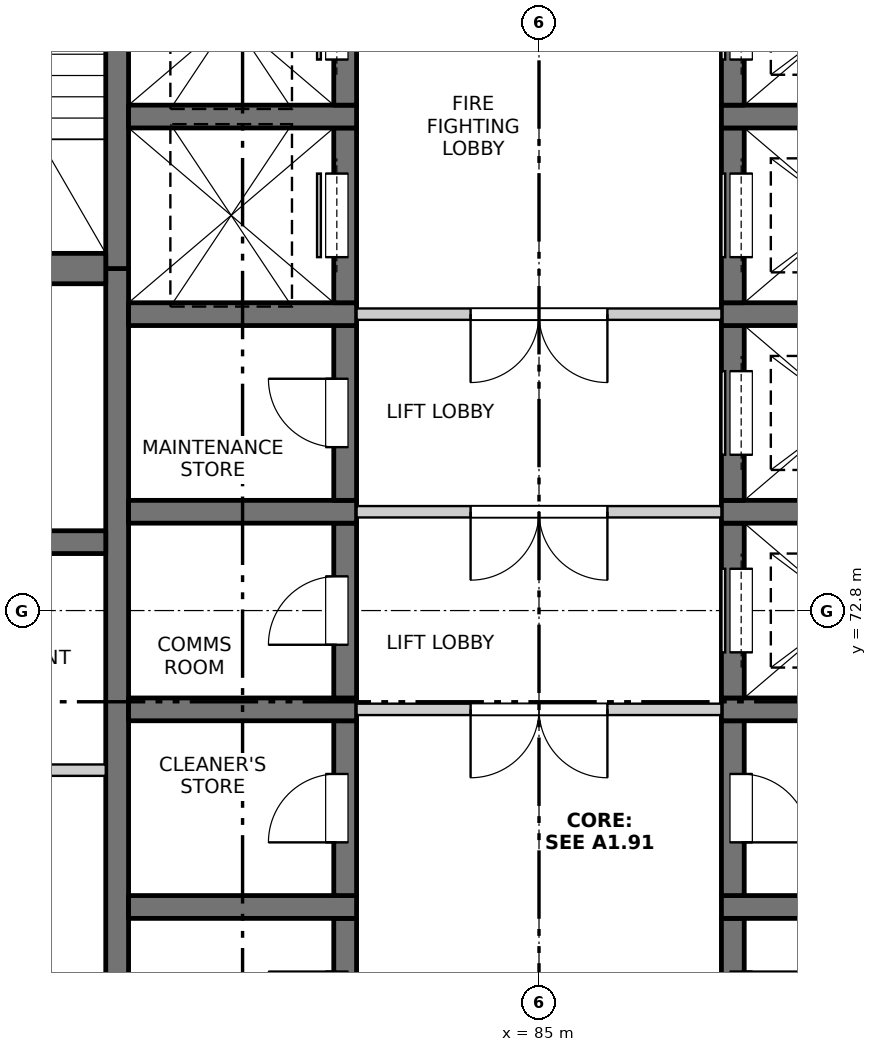
"""IFC4 building model, lengths in metres.
Left out: names, types, materials, properties, quantities, classifications, styles, units other than length and angle.
Written with IfcOpenShell. Run it as: python <this file> out.ifc"""

import sys

from ifc_helpers import new_model, si_unit, direction, frame, frame_2d, origin, place, context, subcontext, project, spatial, rectangle, extrude, element, fill, save


model = new_model("IFC4")
c1 = context("Model", 3, precision=1e-05, world=origin(), true_north=direction((0.0, 1.0)))
c2 = subcontext(c1, "Body", "Model", "MODEL_VIEW")
j1 = project(units=[si_unit("LENGTHUNIT", "METRE"), si_unit("PLANEANGLEUNIT", "RADIAN")], contexts=[c1])
p1 = place(None, origin())
s1 = spatial("IfcSite", under=j1, at=p1, CompositionType="ELEMENT")
p2 = place(p1, origin())
s2 = spatial("IfcBuilding", under=s1, at=p2, CompositionType="ELEMENT")
p3 = place(p2, frame((0.0, 0.0, 140.7)))
s3 = spatial("IfcBuildingStorey", under=s2, at=p3, CompositionType="ELEMENT", Elevation=140.7)
p4 = place(p3, frame((79.45, 60.95, -0.25), z_axis=(0.0, 0.0, 1.0), x_axis=(0.0, 1.0, 0.0)))
e1 = element("IfcWall", 1, at=p4, inside=s3, PredefinedType="SOLIDWALL", context=c2, shape_type="SweptSolid", body=[
    extrude(rectangle(XDim=16.35, YDim=0.3, at=frame_2d((8.175, 0.0))), origin(), (0.0, 0.0, 1.0), 3.35),
])
p5 = place(p3, frame((79.45, 77.3, -0.25), z_axis=(0.0, 0.0, 1.0), x_axis=(0.0, 1.0, 0.0)))
e2 = element("IfcWall", 2, at=p5, inside=s3, PredefinedType="SOLIDWALL", context=c2, shape_type="SweptSolid", body=[
    extrude(rectangle(XDim=6.925, YDim=0.3, at=frame_2d((3.462, 0.0))), origin(), (0.0, 0.0, 1.0), 3.35),
])
p6 = place(p3, frame((82.45, 66.45, -0.25), z_axis=(0.0, 0.0, 1.0), x_axis=(0.0, 1.0, 0.0)))
e3 = element("IfcWall", 3, at=p6, inside=s3, PredefinedType="SOLIDWALL", context=c2, shape_type="SweptSolid", body=[
    extrude(rectangle(XDim=2.3, YDim=0.3, at=frame_2d((1.15, 0.0))), origin(), (0.0, 0.0, 1.0), 3.35),
])
p7 = place(p6, frame((0.7, 0.0, 0.25)))
e4 = element("IfcOpeningElement", 4, at=p7, cuts=e3, PredefinedType="OPENING", context=c2, shape_type="SweptSolid", body=[
    extrude(rectangle(XDim=0.9, YDim=2.1, at=frame_2d((0.45, 1.05))), frame((0.0, 0.16, 0.0), z_axis=(0.0, -1.0, 0.0), x_axis=(1.0, 0.0, 0.0)), (0.0, 0.0, 1.0), 0.32),
])
p8 = place(p3, frame((79.6, 68.9, -0.25), z_axis=(0.0, 0.0, 1.0), x_axis=(1.0, 0.0, 0.0)))
e5 = element("IfcWall", 5, at=p8, inside=s3, PredefinedType="SOLIDWALL", context=c2, shape_type="SweptSolid", body=[
    extrude(rectangle(XDim=3.0, YDim=0.3, at=frame_2d((1.5, 0.0))), origin(), (0.0, 0.0, 1.0), 3.35),
])
p9 = place(p3, frame((82.45, 69.05, -0.25), z_axis=(0.0, 0.0, 1.0), x_axis=(0.0, 1.0, 0.0)))
e6 = element("IfcWall", 6, at=p9, inside=s3, PredefinedType="SOLIDWALL", context=c2, shape_type="SweptSolid", body=[
    extrude(rectangle(XDim=2.3, YDim=0.3, at=frame_2d((1.15, 0.0))), origin(), (0.0, 0.0, 1.0), 3.35),
])
p10 = place(p9, frame((0.7, 0.0, 0.25)))
e7 = element("IfcOpeningElement", 7, at=p10, cuts=e6, PredefinedType="OPENING", context=c2, shape_type="SweptSolid", body=[
    extrude(rectangle(XDim=0.9, YDim=2.1, at=frame_2d((0.45, 1.05))), frame((0.0, 0.16, 0.0), z_axis=(0.0, -1.0, 0.0), x_axis=(1.0, 0.0, 0.0)), (0.0, 0.0, 1.0), 0.32),
])
p11 = place(p3, frame((79.6, 71.5, -0.25), z_axis=(0.0, 0.0, 1.0), x_axis=(1.0, 0.0, 0.0)))
e8 = element("IfcWall", 8, at=p11, inside=s3, PredefinedType="SOLIDWALL", context=c2, shape_type="SweptSolid", body=[
    extrude(rectangle(XDim=3.0, YDim=0.3, at=frame_2d((1.5, 0.0))), origin(), (0.0, 0.0, 1.0), 3.35),
])
p12 = place(p3, frame((82.45, 71.65, -0.25), z_axis=(0.0, 0.0, 1.0), x_axis=(0.0, 1.0, 0.0)))
e9 = element("IfcWall", 9, at=p12, inside=s3, PredefinedType="SOLIDWALL", context=c2, shape_type="SweptSolid", body=[
    extrude(rectangle(XDim=2.3, YDim=0.3, at=frame_2d((1.15, 0.0))), origin(), (0.0, 0.0, 1.0), 3.35),
])
p13 = place(p12, frame((0.7, 0.0, 0.25)))
e10 = element("IfcOpeningElement", 10, at=p13, cuts=e9, PredefinedType="OPENING", context=c2, shape_type="SweptSolid", body=[
    extrude(rectangle(XDim=0.9, YDim=2.1, at=frame_2d((0.45, 1.05))), frame((0.0, 0.16, 0.0), z_axis=(0.0, -1.0, 0.0), x_axis=(1.0, 0.0, 0.0)), (0.0, 0.0, 1.0), 0.32),
])
p14 = place(p3, frame((79.6, 74.1, -0.25), z_axis=(0.0, 0.0, 1.0), x_axis=(1.0, 0.0, 0.0)))
e11 = element("IfcWall", 11, at=p14, inside=s3, PredefinedType="SOLIDWALL", context=c2, shape_type="SweptSolid", body=[
    extrude(rectangle(XDim=3.0, YDim=0.3, at=frame_2d((1.5, 0.0))), origin(), (0.0, 0.0, 1.0), 3.35),
])
p15 = place(p3, frame((82.45, 74.25, -0.25), z_axis=(0.0, 0.0, 1.0), x_axis=(0.0, 1.0, 0.0)))
e12 = element("IfcWall", 12, at=p15, inside=s3, PredefinedType="SOLIDWALL", context=c2, shape_type="SweptSolid", body=[
    extrude(rectangle(XDim=2.3, YDim=0.3, at=frame_2d((1.15, 0.0))), origin(), (0.0, 0.0, 1.0), 3.35),
])
p16 = place(p15, frame((0.7, 0.0, 0.25)))
e13 = element("IfcOpeningElement", 13, at=p16, cuts=e12, PredefinedType="OPENING", context=c2, shape_type="SweptSolid", body=[
    extrude(rectangle(XDim=0.9, YDim=2.1, at=frame_2d((0.45, 1.05))), frame((0.0, 0.16, 0.0), z_axis=(0.0, -1.0, 0.0), x_axis=(1.0, 0.0, 0.0)), (0.0, 0.0, 1.0), 0.32),
])
p17 = place(p3, frame((79.6, 76.7, -0.25), z_axis=(0.0, 0.0, 1.0), x_axis=(1.0, 0.0, 0.0)))
e14 = element("IfcWall", 14, at=p17, inside=s3, PredefinedType="SOLIDWALL", context=c2, shape_type="SweptSolid", body=[
    extrude(rectangle(XDim=3.0, YDim=0.3, at=frame_2d((1.5, 0.0))), origin(), (0.0, 0.0, 1.0), 3.35),
])
p18 = place(p3, frame((82.45, 76.85, -0.25), z_axis=(0.0, 0.0, 1.0), x_axis=(0.0, 1.0, 0.0)))
e15 = element("IfcWall", 15, at=p18, inside=s3, PredefinedType="SOLIDWALL", context=c2, shape_type="SweptSolid", body=[
    extrude(rectangle(XDim=2.3, YDim=0.3, at=frame_2d((1.15, 0.0))), origin(), (0.0, 0.0, 1.0), 3.35),
])
p19 = place(p18, frame((0.6, 0.0, 0.25)))
e16 = element("IfcOpeningElement", 16, at=p19, cuts=e15, PredefinedType="OPENING", context=c2, shape_type="SweptSolid", body=[
    extrude(rectangle(XDim=1.1, YDim=2.1, at=frame_2d((0.55, 1.05))), frame((0.0, 0.16, 0.0), z_axis=(0.0, -1.0, 0.0), x_axis=(1.0, 0.0, 0.0)), (0.0, 0.0, 1.0), 0.32),
])
p20 = place(p3, frame((79.6, 79.3, -0.25), z_axis=(0.0, 0.0, 1.0), x_axis=(1.0, 0.0, 0.0)))
e17 = element("IfcWall", 17, at=p20, inside=s3, PredefinedType="SOLIDWALL", context=c2, shape_type="SweptSolid", body=[
    extrude(rectangle(XDim=3.0, YDim=0.3, at=frame_2d((1.5, 0.0))), origin(), (0.0, 0.0, 1.0), 3.35),
])
p21 = place(p3, frame((82.45, 79.45, -0.25), z_axis=(0.0, 0.0, 1.0), x_axis=(0.0, 1.0, 0.0)))
e18 = element("IfcWall", 18, at=p21, inside=s3, PredefinedType="SOLIDWALL", context=c2, shape_type="SweptSolid", body=[
    extrude(rectangle(XDim=2.3, YDim=0.3, at=frame_2d((1.15, 0.0))), origin(), (0.0, 0.0, 1.0), 3.35),
])
p22 = place(p21, frame((0.6, 0.0, 0.25)))
e19 = element("IfcOpeningElement", 19, at=p22, cuts=e18, PredefinedType="OPENING", context=c2, shape_type="SweptSolid", body=[
    extrude(rectangle(XDim=1.1, YDim=2.1, at=frame_2d((0.55, 1.05))), frame((0.0, 0.16, 0.0), z_axis=(0.0, -1.0, 0.0), x_axis=(1.0, 0.0, 0.0)), (0.0, 0.0, 1.0), 0.32),
])
p23 = place(p3, frame((87.55, 66.45, -0.25), z_axis=(0.0, 0.0, 1.0), x_axis=(0.0, 1.0, 0.0)))
e20 = element("IfcWall", 20, at=p23, inside=s3, PredefinedType="SOLIDWALL", context=c2, shape_type="SweptSolid", body=[
    extrude(rectangle(XDim=2.3, YDim=0.3, at=frame_2d((1.15, 0.0))), origin(), (0.0, 0.0, 1.0), 3.35),
])
p24 = place(p23, frame((0.7, 0.0, 0.25)))
e21 = element("IfcOpeningElement", 21, at=p24, cuts=e20, PredefinedType="OPENING", context=c2, shape_type="SweptSolid", body=[
    extrude(rectangle(XDim=0.9, YDim=2.1, at=frame_2d((0.45, 1.05))), frame((0.0, 0.16, 0.0), z_axis=(0.0, -1.0, 0.0), x_axis=(1.0, 0.0, 0.0)), (0.0, 0.0, 1.0), 0.32),
])
p25 = place(p3, frame((87.4, 68.9, -0.25), z_axis=(0.0, 0.0, 1.0), x_axis=(1.0, 0.0, 0.0)))
e22 = element("IfcWall", 22, at=p25, inside=s3, PredefinedType="SOLIDWALL", context=c2, shape_type="SweptSolid", body=[
    extrude(rectangle(XDim=3.0, YDim=0.3, at=frame_2d((1.5, 0.0))), origin(), (0.0, 0.0, 1.0), 3.35),
])
p26 = place(p3, frame((87.55, 69.05, -0.25), z_axis=(0.0, 0.0, 1.0), x_axis=(0.0, 1.0, 0.0)))
e23 = element("IfcWall", 23, at=p26, inside=s3, PredefinedType="SOLIDWALL", context=c2, shape_type="SweptSolid", body=[
    extrude(rectangle(XDim=2.3, YDim=0.3, at=frame_2d((1.15, 0.0))), origin(), (0.0, 0.0, 1.0), 3.35),
])
p27 = place(p26, frame((0.7, 0.0, 0.25)))
e24 = element("IfcOpeningElement", 24, at=p27, cuts=e23, PredefinedType="OPENING", context=c2, shape_type="SweptSolid", body=[
    extrude(rectangle(XDim=0.9, YDim=2.1, at=frame_2d((0.45, 1.05))), frame((0.0, 0.16, 0.0), z_axis=(0.0, -1.0, 0.0), x_axis=(1.0, 0.0, 0.0)), (0.0, 0.0, 1.0), 0.32),
])
p28 = place(p3, frame((87.4, 71.5, -0.25), z_axis=(0.0, 0.0, 1.0), x_axis=(1.0, 0.0, 0.0)))
e25 = element("IfcWall", 25, at=p28, inside=s3, PredefinedType="SOLIDWALL", context=c2, shape_type="SweptSolid", body=[
    extrude(rectangle(XDim=3.0, YDim=0.3, at=frame_2d((1.5, 0.0))), origin(), (0.0, 0.0, 1.0), 3.35),
])
p29 = place(p3, frame((87.55, 71.65, -0.25), z_axis=(0.0, 0.0, 1.0), x_axis=(0.0, 1.0, 0.0)))
e26 = element("IfcWall", 26, at=p29, inside=s3, PredefinedType="SOLIDWALL", context=c2, shape_type="SweptSolid", body=[
    extrude(rectangle(XDim=2.3, YDim=0.3, at=frame_2d((1.15, 0.0))), origin(), (0.0, 0.0, 1.0), 3.35),
])
p30 = place(p29, frame((0.6, 0.0, 0.25)))
e27 = element("IfcOpeningElement", 27, at=p30, cuts=e26, PredefinedType="OPENING", context=c2, shape_type="SweptSolid", body=[
    extrude(rectangle(XDim=1.1, YDim=2.1, at=frame_2d((0.55, 1.05))), frame((0.0, 0.16, 0.0), z_axis=(0.0, -1.0, 0.0), x_axis=(1.0, 0.0, 0.0)), (0.0, 0.0, 1.0), 0.32),
])
p31 = place(p3, frame((87.4, 74.1, -0.25), z_axis=(0.0, 0.0, 1.0), x_axis=(1.0, 0.0, 0.0)))
e28 = element("IfcWall", 28, at=p31, inside=s3, PredefinedType="SOLIDWALL", context=c2, shape_type="SweptSolid", body=[
    extrude(rectangle(XDim=3.0, YDim=0.3, at=frame_2d((1.5, 0.0))), origin(), (0.0, 0.0, 1.0), 3.35),
])
p32 = place(p3, frame((87.55, 74.25, -0.25), z_axis=(0.0, 0.0, 1.0), x_axis=(0.0, 1.0, 0.0)))
e29 = element("IfcWall", 29, at=p32, inside=s3, PredefinedType="SOLIDWALL", context=c2, shape_type="SweptSolid", body=[
    extrude(rectangle(XDim=2.3, YDim=0.3, at=frame_2d((1.15, 0.0))), origin(), (0.0, 0.0, 1.0), 3.35),
])
p33 = place(p32, frame((0.6, 0.0, 0.25)))
e30 = element("IfcOpeningElement", 30, at=p33, cuts=e29, PredefinedType="OPENING", context=c2, shape_type="SweptSolid", body=[
    extrude(rectangle(XDim=1.1, YDim=2.1, at=frame_2d((0.55, 1.05))), frame((0.0, 0.16, 0.0), z_axis=(0.0, -1.0, 0.0), x_axis=(1.0, 0.0, 0.0)), (0.0, 0.0, 1.0), 0.32),
])
p34 = place(p3, frame((87.4, 76.7, -0.25), z_axis=(0.0, 0.0, 1.0), x_axis=(1.0, 0.0, 0.0)))
e31 = element("IfcWall", 31, at=p34, inside=s3, PredefinedType="SOLIDWALL", context=c2, shape_type="SweptSolid", body=[
    extrude(rectangle(XDim=3.0, YDim=0.3, at=frame_2d((1.5, 0.0))), origin(), (0.0, 0.0, 1.0), 3.35),
])
p35 = place(p3, frame((87.55, 76.85, -0.25), z_axis=(0.0, 0.0, 1.0), x_axis=(0.0, 1.0, 0.0)))
e32 = element("IfcWall", 32, at=p35, inside=s3, PredefinedType="SOLIDWALL", context=c2, shape_type="SweptSolid", body=[
    extrude(rectangle(XDim=2.3, YDim=0.3, at=frame_2d((1.15, 0.0))), origin(), (0.0, 0.0, 1.0), 3.35),
])
p36 = place(p35, frame((0.6, 0.0, 0.25)))
e33 = element("IfcOpeningElement", 33, at=p36, cuts=e32, PredefinedType="OPENING", context=c2, shape_type="SweptSolid", body=[
    extrude(rectangle(XDim=1.1, YDim=2.1, at=frame_2d((0.55, 1.05))), frame((0.0, 0.16, 0.0), z_axis=(0.0, -1.0, 0.0), x_axis=(1.0, 0.0, 0.0)), (0.0, 0.0, 1.0), 0.32),
])
p37 = place(p3, frame((87.4, 79.3, -0.25), z_axis=(0.0, 0.0, 1.0), x_axis=(1.0, 0.0, 0.0)))
e34 = element("IfcWall", 34, at=p37, inside=s3, PredefinedType="SOLIDWALL", context=c2, shape_type="SweptSolid", body=[
    extrude(rectangle(XDim=3.0, YDim=0.3, at=frame_2d((1.5, 0.0))), origin(), (0.0, 0.0, 1.0), 3.35),
])
p38 = place(p3, frame((87.55, 79.45, -0.25), z_axis=(0.0, 0.0, 1.0), x_axis=(0.0, 1.0, 0.0)))
e35 = element("IfcWall", 35, at=p38, inside=s3, PredefinedType="SOLIDWALL", context=c2, shape_type="SweptSolid", body=[
    extrude(rectangle(XDim=2.3, YDim=0.3, at=frame_2d((1.15, 0.0))), origin(), (0.0, 0.0, 1.0), 3.35),
])
p39 = place(p38, frame((0.6, 0.0, 0.25)))
e36 = element("IfcOpeningElement", 36, at=p39, cuts=e35, PredefinedType="OPENING", context=c2, shape_type="SweptSolid", body=[
    extrude(rectangle(XDim=1.1, YDim=2.1, at=frame_2d((0.55, 1.05))), frame((0.0, 0.16, 0.0), z_axis=(0.0, -1.0, 0.0), x_axis=(1.0, 0.0, 0.0)), (0.0, 0.0, 1.0), 0.32),
])
p40 = place(p3, frame((75.525, 73.7, -0.25), z_axis=(0.0, 0.0, 1.0), x_axis=(1.0, 0.0, 0.0)))
e37 = element("IfcWall", 37, at=p40, inside=s3, PredefinedType="SOLIDWALL", context=c2, shape_type="SweptSolid", body=[
    extrude(rectangle(XDim=3.775, YDim=0.3, at=frame_2d((1.888, 0.0))), origin(), (0.0, 0.0, 1.0), 3.35),
])
p41 = place(p3, frame((75.525, 77.3, -0.25), z_axis=(0.0, 0.0, 1.0), x_axis=(1.0, 0.0, 0.0)))
e38 = element("IfcWall", 38, at=p41, inside=s3, PredefinedType="SOLIDWALL", context=c2, shape_type="SweptSolid", body=[
    extrude(rectangle(XDim=3.775, YDim=0.4, at=frame_2d((1.888, 0.0))), origin(), (0.0, 0.0, 1.0), 3.35),
])
p42 = place(p3, frame((75.525, 70.7, 0.0), z_axis=(0.0, 0.0, 1.0), x_axis=(1.0, 0.0, 0.0)))
e39 = element("IfcWall", 39, at=p42, inside=s3, PredefinedType="PARTITIONING", context=c2, shape_type="SweptSolid", body=[
    extrude(rectangle(XDim=3.775, YDim=0.15, at=frame_2d((1.887, 0.0))), origin(), (0.0, 0.0, 1.0), 3.1),
])
p43 = place(p3, frame((82.6, 71.5, 0.0), z_axis=(0.0, 0.0, 1.0), x_axis=(1.0, 0.0, 0.0)))
e40 = element("IfcWall", 40, at=p43, inside=s3, PredefinedType="PARTITIONING", context=c2, shape_type="SweptSolid", body=[
    extrude(rectangle(XDim=4.8, YDim=0.15, at=frame_2d((2.4, 0.0))), origin(), (0.0, 0.0, 1.0), 3.1),
])
p44 = place(p43, frame((1.5, 0.0, 0.0)))
e41 = element("IfcOpeningElement", 41, at=p44, cuts=e40, PredefinedType="OPENING", context=c2, shape_type="SweptSolid", body=[
    extrude(rectangle(XDim=1.8, YDim=2.1, at=frame_2d((0.9, 1.05))), frame((0.0, 0.085, 0.0), z_axis=(0.0, -1.0, 0.0), x_axis=(1.0, 0.0, 0.0)), (0.0, 0.0, 1.0), 0.17),
])
p45 = place(p3, frame((82.6, 74.1, 0.0), z_axis=(0.0, 0.0, 1.0), x_axis=(1.0, 0.0, 0.0)))
e42 = element("IfcWall", 42, at=p45, inside=s3, PredefinedType="PARTITIONING", context=c2, shape_type="SweptSolid", body=[
    extrude(rectangle(XDim=4.8, YDim=0.15, at=frame_2d((2.4, 0.0))), origin(), (0.0, 0.0, 1.0), 3.1),
])
p46 = place(p45, frame((1.5, 0.0, 0.0)))
e43 = element("IfcOpeningElement", 43, at=p46, cuts=e42, PredefinedType="OPENING", context=c2, shape_type="SweptSolid", body=[
    extrude(rectangle(XDim=1.8, YDim=2.1, at=frame_2d((0.9, 1.05))), frame((0.0, 0.085, 0.0), z_axis=(0.0, -1.0, 0.0), x_axis=(1.0, 0.0, 0.0)), (0.0, 0.0, 1.0), 0.17),
])
p47 = place(p3, frame((82.6, 76.7, 0.0), z_axis=(0.0, 0.0, 1.0), x_axis=(1.0, 0.0, 0.0)))
e44 = element("IfcWall", 44, at=p47, inside=s3, PredefinedType="PARTITIONING", context=c2, shape_type="SweptSolid", body=[
    extrude(rectangle(XDim=4.8, YDim=0.15, at=frame_2d((2.4, 0.0))), origin(), (0.0, 0.0, 1.0), 3.1),
])
p48 = place(p47, frame((1.5, 0.0, 0.0)))
e45 = element("IfcOpeningElement", 45, at=p48, cuts=e44, PredefinedType="OPENING", context=c2, shape_type="SweptSolid", body=[
    extrude(rectangle(XDim=1.8, YDim=2.1, at=frame_2d((0.9, 1.05))), frame((0.0, 0.085, 0.0), z_axis=(0.0, -1.0, 0.0), x_axis=(1.0, 0.0, 0.0)), (0.0, 0.0, 1.0), 0.17),
])
p49 = place(p10, origin())
e46 = element("IfcDoor", 46, at=p49, inside=s3, OperationType="SINGLE_SWING_LEFT", PredefinedType="DOOR", context=c2, shape_type="SweptSolid", body=[
    extrude(rectangle(XDim=0.9, YDim=2.1, at=frame_2d((0.45, 1.05))), frame((0.0, 0.135, 0.0), z_axis=(0.0, -1.0, 0.0), x_axis=(1.0, 0.0, 0.0)), (0.0, 0.0, 1.0), 0.05),
])
fill(e7, e46)
p50 = place(p27, origin())
e47 = element("IfcDoor", 47, at=p50, inside=s3, OperationType="SINGLE_SWING_RIGHT", PredefinedType="DOOR", context=c2, shape_type="SweptSolid", body=[
    extrude(rectangle(XDim=0.9, YDim=2.1, at=frame_2d((0.45, 1.05))), frame((0.0, -0.085, 0.0), z_axis=(0.0, -1.0, 0.0), x_axis=(1.0, 0.0, 0.0)), (0.0, 0.0, 1.0), 0.05),
])
fill(e24, e47)
p51 = place(p44, origin())
e48 = element("IfcDoor", 48, at=p51, inside=s3, OperationType="DOUBLE_DOOR_SINGLE_SWING", PredefinedType="DOOR", context=c2, shape_type="SweptSolid", body=[
    extrude(rectangle(XDim=1.8, YDim=2.1, at=frame_2d((0.9, 1.05))), frame((0.0, 0.025, 0.0), z_axis=(0.0, -1.0, 0.0), x_axis=(1.0, 0.0, 0.0)), (0.0, 0.0, 1.0), 0.05),
])
fill(e41, e48)
p52 = place(p13, origin())
e49 = element("IfcDoor", 49, at=p52, inside=s3, OperationType="SINGLE_SWING_LEFT", PredefinedType="DOOR", context=c2, shape_type="SweptSolid", body=[
    extrude(rectangle(XDim=0.9, YDim=2.1, at=frame_2d((0.45, 1.05))), frame((0.0, 0.135, 0.0), z_axis=(0.0, -1.0, 0.0), x_axis=(1.0, 0.0, 0.0)), (0.0, 0.0, 1.0), 0.05),
])
fill(e10, e49)
p53 = place(p30, origin())
e50 = element("IfcDoor", 50, at=p53, inside=s3, OperationType="SLIDING_TO_LEFT", PredefinedType="DOOR", context=c2, shape_type="SweptSolid", body=[
    extrude(rectangle(XDim=1.1, YDim=2.1, at=frame_2d((0.55, 1.05))), frame((0.0, -0.085, 0.0), z_axis=(0.0, -1.0, 0.0), x_axis=(1.0, 0.0, 0.0)), (0.0, 0.0, 1.0), 0.05),
])
fill(e27, e50)
p54 = place(p46, origin())
e51 = element("IfcDoor", 51, at=p54, inside=s3, OperationType="DOUBLE_DOOR_SINGLE_SWING", PredefinedType="DOOR", context=c2, shape_type="SweptSolid", body=[
    extrude(rectangle(XDim=1.8, YDim=2.1, at=frame_2d((0.9, 1.05))), frame((0.0, 0.025, 0.0), z_axis=(0.0, -1.0, 0.0), x_axis=(1.0, 0.0, 0.0)), (0.0, 0.0, 1.0), 0.05),
])
fill(e43, e51)
p55 = place(p16, origin())
e52 = element("IfcDoor", 52, at=p55, inside=s3, OperationType="SINGLE_SWING_RIGHT", PredefinedType="DOOR", context=c2, shape_type="SweptSolid", body=[
    extrude(rectangle(XDim=0.9, YDim=2.1, at=frame_2d((0.45, 1.05))), frame((0.0, 0.135, 0.0), z_axis=(0.0, -1.0, 0.0), x_axis=(1.0, 0.0, 0.0)), (0.0, 0.0, 1.0), 0.05),
])
fill(e13, e52)
p56 = place(p33, origin())
e53 = element("IfcDoor", 53, at=p56, inside=s3, OperationType="SLIDING_TO_LEFT", PredefinedType="DOOR", context=c2, shape_type="SweptSolid", body=[
    extrude(rectangle(XDim=1.1, YDim=2.1, at=frame_2d((0.55, 1.05))), frame((0.0, -0.085, 0.0), z_axis=(0.0, -1.0, 0.0), x_axis=(1.0, 0.0, 0.0)), (0.0, 0.0, 1.0), 0.05),
])
fill(e30, e53)
p57 = place(p48, origin())
e54 = element("IfcDoor", 54, at=p57, inside=s3, OperationType="DOUBLE_DOOR_SINGLE_SWING", PredefinedType="DOOR", context=c2, shape_type="SweptSolid", body=[
    extrude(rectangle(XDim=1.8, YDim=2.1, at=frame_2d((0.9, 1.05))), frame((0.0, 0.025, 0.0), z_axis=(0.0, -1.0, 0.0), x_axis=(1.0, 0.0, 0.0)), (0.0, 0.0, 1.0), 0.05),
])
fill(e45, e54)
p58 = place(p19, origin())
e55 = element("IfcDoor", 55, at=p58, inside=s3, OperationType="SLIDING_TO_LEFT", PredefinedType="DOOR", context=c2, shape_type="SweptSolid", body=[
    extrude(rectangle(XDim=1.1, YDim=2.1, at=frame_2d((0.55, 1.05))), frame((0.0, 0.135, 0.0), z_axis=(0.0, -1.0, 0.0), x_axis=(1.0, 0.0, 0.0)), (0.0, 0.0, 1.0), 0.05),
])
fill(e16, e55)
p59 = place(p36, origin())
e56 = element("IfcDoor", 56, at=p59, inside=s3, OperationType="SLIDING_TO_LEFT", PredefinedType="DOOR", context=c2, shape_type="SweptSolid", body=[
    extrude(rectangle(XDim=1.1, YDim=2.1, at=frame_2d((0.55, 1.05))), frame((0.0, -0.085, 0.0), z_axis=(0.0, -1.0, 0.0), x_axis=(1.0, 0.0, 0.0)), (0.0, 0.0, 1.0), 0.05),
])
fill(e33, e56)
p60 = place(p22, origin())
e57 = element("IfcDoor", 57, at=p60, inside=s3, OperationType="SLIDING_TO_LEFT", PredefinedType="DOOR", context=c2, shape_type="SweptSolid", body=[
    extrude(rectangle(XDim=1.1, YDim=2.1, at=frame_2d((0.55, 1.05))), frame((0.0, 0.135, 0.0), z_axis=(0.0, -1.0, 0.0), x_axis=(1.0, 0.0, 0.0)), (0.0, 0.0, 1.0), 0.05),
])
fill(e19, e57)
p61 = place(p39, origin())
e58 = element("IfcDoor", 58, at=p61, inside=s3, OperationType="SLIDING_TO_RIGHT", PredefinedType="DOOR", context=c2, shape_type="SweptSolid", body=[
    extrude(rectangle(XDim=1.1, YDim=2.1, at=frame_2d((0.55, 1.05))), frame((0.0, -0.085, 0.0), z_axis=(0.0, -1.0, 0.0), x_axis=(1.0, 0.0, 0.0)), (0.0, 0.0, 1.0), 0.05),
])
fill(e36, e58)
save(model, sys.argv[1])
